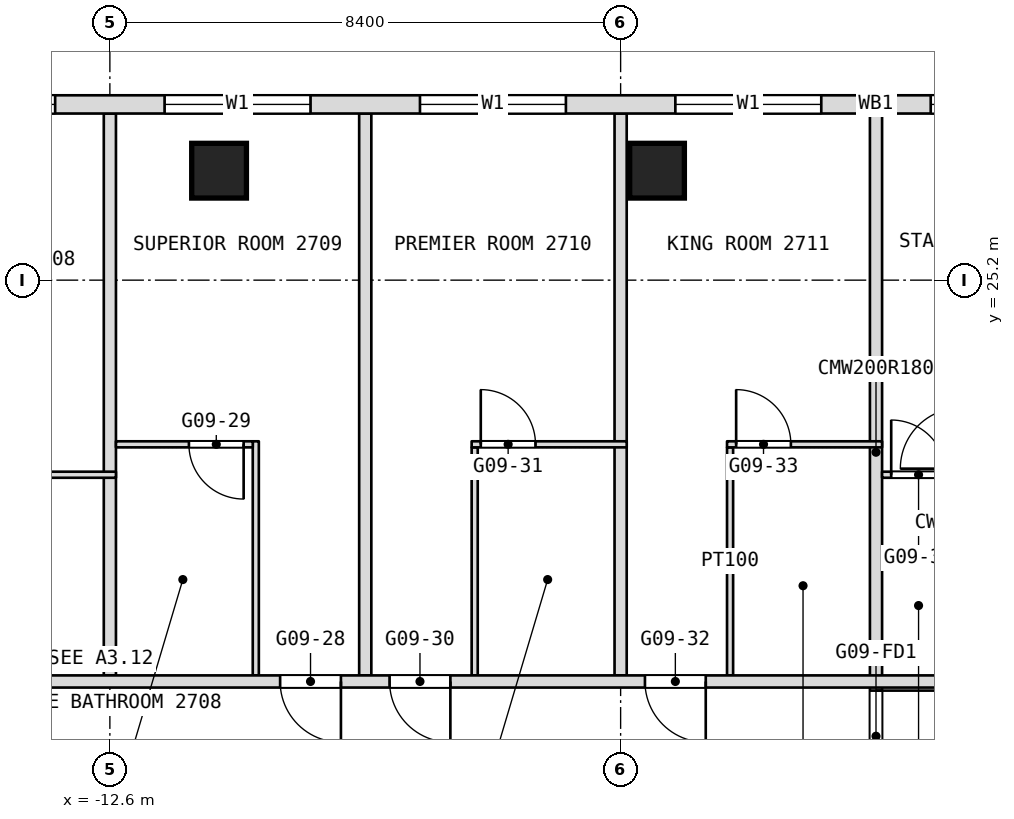
"""IFC4 building model, lengths in metres.
Left out: names, types, materials, properties, quantities, classifications, styles, units other than length and angle.
Written with IfcOpenShell. Run it as: python <this file> out.ifc"""

import sys

from ifc_helpers import new_model, si_unit, direction, frame, frame_2d, origin, origin_2d, place, context, subcontext, project, spatial, rectangle, extrude, element, fill, save


model = new_model("IFC4")
c1 = context("Model", 3, precision=1e-05, world=origin(), true_north=direction((0.0, 1.0)))
c2 = subcontext(c1, "Body", "Model", "MODEL_VIEW")
j1 = project(units=[si_unit("LENGTHUNIT", "METRE"), si_unit("PLANEANGLEUNIT", "RADIAN")], contexts=[c1])
p1 = place(None, origin())
s1 = spatial("IfcSite", under=j1, at=p1, CompositionType="ELEMENT")
p2 = place(p1, origin())
s2 = spatial("IfcBuilding", under=s1, at=p2, CompositionType="ELEMENT")
p3 = place(p2, frame((0.0, 0.0, 122.9)))
s3 = spatial("IfcBuildingStorey", under=s2, at=p3, CompositionType="ELEMENT", Elevation=122.9)
for number, where, z_axis, x_axis in (
    (1, (-10.804, 27.0, 0.0), (0.0, 0.0, 1.0), (1.0, 0.0, 0.0)),
    (2, (-3.601, 27.0, 0.0), (0.0, 0.0, 1.0), (1.0, 0.0, 0.0)),
):
    element("IfcColumn", number, at=place(p3, frame(where, z_axis=z_axis, x_axis=x_axis)), inside=s3, PredefinedType="COLUMN", context=c2, shape_type="SweptSolid", body=[
        extrude(rectangle(XDim=0.9, YDim=0.9, at=origin_2d()), origin(), (0.0, 0.0, 1.0), 3.6),
    ])
p4 = place(p3, frame((0.0, 16.8, 0.0), z_axis=(0.0, 0.0, 1.0), x_axis=(0.0, 1.0, 0.0)))
e3 = element("IfcWall", 3, at=p4, inside=s3, PredefinedType="PARTITIONING", context=c2, shape_type="SweptSolid", body=[
    extrude(rectangle(XDim=11.14, YDim=0.2, at=frame_2d((5.57, 0.0))), origin(), (0.0, 0.0, 1.0), 3.34),
])
p5 = place(p4, frame((0.15, 0.0, 0.0)))
e4 = element("IfcOpeningElement", 4, at=p5, cuts=e3, PredefinedType="OPENING", context=c2, shape_type="SweptSolid", body=[
    extrude(rectangle(XDim=1.5, YDim=2.1, at=frame_2d((0.75, 1.05))), frame((0.0, 0.1, 0.0), z_axis=(0.0, -1.0, 0.0), x_axis=(1.0, 0.0, 0.0)), (0.0, 0.0, 1.0), 0.2),
])
p6 = place(p3, frame((-2.4, 18.7, 0.0), z_axis=(0.0, 0.0, 1.0), x_axis=(0.0, 1.0, 0.0)))
e5 = element("IfcWall", 5, at=p6, inside=s3, PredefinedType="PARTITIONING", context=c2, shape_type="SweptSolid", body=[
    extrude(rectangle(XDim=3.75, YDim=0.1, at=frame_2d((1.875, 0.0))), origin(), (0.0, 0.0, 1.0), 3.34),
])
p7 = place(p3, frame((-4.2, 18.7, 0.0), z_axis=(0.0, 0.0, 1.0), x_axis=(0.0, 1.0, 0.0)))
e6 = element("IfcWall", 6, at=p7, inside=s3, PredefinedType="PARTITIONING", context=c2, shape_type="SweptSolid", body=[
    extrude(rectangle(XDim=9.24, YDim=0.2, at=frame_2d((4.62, 0.0))), origin(), (0.0, 0.0, 1.0), 3.34),
])
p8 = place(p3, frame((-6.6, 18.7, 0.0), z_axis=(0.0, 0.0, 1.0), x_axis=(0.0, 1.0, 0.0)))
e7 = element("IfcWall", 7, at=p8, inside=s3, PredefinedType="PARTITIONING", context=c2, shape_type="SweptSolid", body=[
    extrude(rectangle(XDim=3.75, YDim=0.1, at=frame_2d((1.875, 0.0))), origin(), (0.0, 0.0, 1.0), 3.34),
])
p9 = place(p3, frame((-8.4, 18.7, 0.0), z_axis=(0.0, 0.0, 1.0), x_axis=(0.0, 1.0, 0.0)))
e8 = element("IfcWall", 8, at=p9, inside=s3, PredefinedType="PARTITIONING", context=c2, shape_type="SweptSolid", body=[
    extrude(rectangle(XDim=9.24, YDim=0.2, at=frame_2d((4.62, 0.0))), origin(), (0.0, 0.0, 1.0), 3.34),
])
p10 = place(p3, frame((-10.2, 18.7, 0.0), z_axis=(0.0, 0.0, 1.0), x_axis=(0.0, 1.0, 0.0)))
e9 = element("IfcWall", 9, at=p10, inside=s3, PredefinedType="PARTITIONING", context=c2, shape_type="SweptSolid", body=[
    extrude(rectangle(XDim=3.85, YDim=0.1, at=frame_2d((1.925, 0.0))), origin(), (0.0, 0.0, 1.0), 3.34),
])
p11 = place(p3, frame((-12.6, 18.7, 0.0), z_axis=(0.0, 0.0, 1.0), x_axis=(0.0, 1.0, 0.0)))
e10 = element("IfcWall", 10, at=p11, inside=s3, PredefinedType="PARTITIONING", context=c2, shape_type="SweptSolid", body=[
    extrude(rectangle(XDim=9.24, YDim=0.2, at=frame_2d((4.62, 0.0))), origin(), (0.0, 0.0, 1.0), 3.34),
])
p12 = place(p3, frame((-16.9, 18.6, 0.0), z_axis=(0.0, 0.0, 1.0), x_axis=(1.0, 0.0, 0.0)))
e11 = element("IfcWall", 11, at=p12, inside=s3, PredefinedType="PARTITIONING", context=c2, shape_type="SweptSolid", body=[
    extrude(rectangle(XDim=18.4, YDim=0.2, at=frame_2d((9.2, 0.0))), origin(), (0.0, 0.0, 1.0), 3.34),
])
p13 = place(p12, frame((0.5, 0.0, 0.0)))
e12 = element("IfcOpeningElement", 12, at=p13, cuts=e11, PredefinedType="OPENING", context=c2, shape_type="SweptSolid", body=[
    extrude(rectangle(XDim=1.0, YDim=2.1, at=frame_2d((0.5, 1.05))), frame((0.0, 0.1, 0.0), z_axis=(0.0, -1.0, 0.0), x_axis=(1.0, 0.0, 0.0)), (0.0, 0.0, 1.0), 0.2),
])
p14 = place(p12, frame((7.1, 0.0, 0.0)))
e13 = element("IfcOpeningElement", 13, at=p14, cuts=e11, PredefinedType="OPENING", context=c2, shape_type="SweptSolid", body=[
    extrude(rectangle(XDim=1.0, YDim=2.1, at=frame_2d((0.5, 1.05))), frame((0.0, 0.1, 0.0), z_axis=(0.0, -1.0, 0.0), x_axis=(1.0, 0.0, 0.0)), (0.0, 0.0, 1.0), 0.2),
])
p15 = place(p12, frame((8.9, 0.0, 0.0)))
e14 = element("IfcOpeningElement", 14, at=p15, cuts=e11, PredefinedType="OPENING", context=c2, shape_type="SweptSolid", body=[
    extrude(rectangle(XDim=1.0, YDim=2.1, at=frame_2d((0.5, 1.05))), frame((0.0, 0.1, 0.0), z_axis=(0.0, -1.0, 0.0), x_axis=(1.0, 0.0, 0.0)), (0.0, 0.0, 1.0), 0.2),
])
p16 = place(p12, frame((13.1, 0.0, 0.0)))
e15 = element("IfcOpeningElement", 15, at=p16, cuts=e11, PredefinedType="OPENING", context=c2, shape_type="SweptSolid", body=[
    extrude(rectangle(XDim=1.0, YDim=2.1, at=frame_2d((0.5, 1.05))), frame((0.0, 0.1, 0.0), z_axis=(0.0, -1.0, 0.0), x_axis=(1.0, 0.0, 0.0)), (0.0, 0.0, 1.0), 0.2),
])
p17 = place(p3, frame((-15.05, 22.0, 0.0), z_axis=(0.0, 0.0, 1.0), x_axis=(1.0, 0.0, 0.0)))
e16 = element("IfcWall", 16, at=p17, inside=s3, PredefinedType="PARTITIONING", context=c2, shape_type="SweptSolid", body=[
    extrude(rectangle(XDim=2.55, YDim=0.1, at=frame_2d((1.275, 0.0))), origin(), (0.0, 0.0, 1.0), 3.34),
])
p18 = place(p17, frame((0.15, 0.0, 0.0)))
e17 = element("IfcOpeningElement", 17, at=p18, cuts=e16, PredefinedType="OPENING", context=c2, shape_type="SweptSolid", body=[
    extrude(rectangle(XDim=0.9, YDim=2.1, at=frame_2d((0.45, 1.05))), frame((0.0, 0.05, 0.0), z_axis=(0.0, -1.0, 0.0), x_axis=(1.0, 0.0, 0.0)), (0.0, 0.0, 1.0), 0.1),
])
p19 = place(p3, frame((0.1, 22.0, 0.0), z_axis=(0.0, 0.0, 1.0), x_axis=(1.0, 0.0, 0.0)))
e18 = element("IfcWall", 18, at=p19, inside=s3, PredefinedType="PARTITIONING", context=c2, shape_type="SweptSolid", body=[
    extrude(rectangle(XDim=1.2, YDim=0.1, at=frame_2d((0.6, 0.0))), origin(), (0.0, 0.0, 1.0), 3.34),
])
p20 = place(p19, frame((0.15, 0.0, 0.0)))
e19 = element("IfcOpeningElement", 19, at=p20, cuts=e18, PredefinedType="OPENING", context=c2, shape_type="SweptSolid", body=[
    extrude(rectangle(XDim=0.9, YDim=2.1, at=frame_2d((0.45, 1.05))), frame((0.0, 0.05, 0.0), z_axis=(0.0, -1.0, 0.0), x_axis=(1.0, 0.0, 0.0)), (0.0, 0.0, 1.0), 0.1),
])
p21 = place(p3, frame((-12.5, 22.5, 0.0), z_axis=(0.0, 0.0, 1.0), x_axis=(1.0, 0.0, 0.0)))
e20 = element("IfcWall", 20, at=p21, inside=s3, PredefinedType="PARTITIONING", context=c2, shape_type="SweptSolid", body=[
    extrude(rectangle(XDim=2.25, YDim=0.1, at=frame_2d((1.125, 0.0))), origin(), (0.0, 0.0, 1.0), 3.34),
])
p22 = place(p21, frame((1.2, 0.0, 0.0)))
e21 = element("IfcOpeningElement", 21, at=p22, cuts=e20, PredefinedType="OPENING", context=c2, shape_type="SweptSolid", body=[
    extrude(rectangle(XDim=0.9, YDim=2.1, at=frame_2d((0.45, 1.05))), frame((0.0, 0.05, 0.0), z_axis=(0.0, -1.0, 0.0), x_axis=(1.0, 0.0, 0.0)), (0.0, 0.0, 1.0), 0.1),
])
p23 = place(p3, frame((-6.65, 22.5, 0.0), z_axis=(0.0, 0.0, 1.0), x_axis=(1.0, 0.0, 0.0)))
e22 = element("IfcWall", 22, at=p23, inside=s3, PredefinedType="PARTITIONING", context=c2, shape_type="SweptSolid", body=[
    extrude(rectangle(XDim=2.55, YDim=0.1, at=frame_2d((1.275, 0.0))), origin(), (0.0, 0.0, 1.0), 3.34),
])
p24 = place(p23, frame((0.15, 0.0, 0.0)))
e23 = element("IfcOpeningElement", 23, at=p24, cuts=e22, PredefinedType="OPENING", context=c2, shape_type="SweptSolid", body=[
    extrude(rectangle(XDim=0.9, YDim=2.1, at=frame_2d((0.45, 1.05))), frame((0.0, 0.05, 0.0), z_axis=(0.0, -1.0, 0.0), x_axis=(1.0, 0.0, 0.0)), (0.0, 0.0, 1.0), 0.1),
])
p25 = place(p3, frame((-2.45, 22.5, 0.0), z_axis=(0.0, 0.0, 1.0), x_axis=(1.0, 0.0, 0.0)))
e24 = element("IfcWall", 24, at=p25, inside=s3, PredefinedType="PARTITIONING", context=c2, shape_type="SweptSolid", body=[
    extrude(rectangle(XDim=2.55, YDim=0.1, at=frame_2d((1.275, 0.0))), origin(), (0.0, 0.0, 1.0), 3.34),
])
p26 = place(p25, frame((0.15, 0.0, 0.0)))
e25 = element("IfcOpeningElement", 25, at=p26, cuts=e24, PredefinedType="OPENING", context=c2, shape_type="SweptSolid", body=[
    extrude(rectangle(XDim=0.9, YDim=2.1, at=frame_2d((0.45, 1.05))), frame((0.0, 0.05, 0.0), z_axis=(0.0, -1.0, 0.0), x_axis=(1.0, 0.0, 0.0)), (0.0, 0.0, 1.0), 0.1),
])
p27 = place(p3, frame((21.306, 28.09, 0.0), z_axis=(0.0, 0.0, 1.0), x_axis=(-1.0, 0.0, 0.0)))
e26 = element("IfcWall", 26, at=p27, inside=s3, PredefinedType="NOTDEFINED", context=c2, shape_type="SweptSolid", body=[
    extrude(rectangle(XDim=42.612, YDim=0.3, at=frame_2d((21.306, 0.0))), origin(), (0.0, 0.0, 1.0), 3.6),
])
p28 = place(p27, frame((5.406, 0.0, 0.9)))
e27 = element("IfcOpeningElement", 27, at=p28, cuts=e26, PredefinedType="OPENING", context=c2, shape_type="SweptSolid", body=[
    extrude(rectangle(XDim=2.4, YDim=2.1, at=frame_2d((1.2, 1.05))), frame((0.0, 0.15, 0.0), z_axis=(0.0, -1.0, 0.0), x_axis=(1.0, 0.0, 0.0)), (0.0, 0.0, 1.0), 0.3),
])
p29 = place(p27, frame((9.606, 0.0, 0.9)))
e28 = element("IfcOpeningElement", 28, at=p29, cuts=e26, PredefinedType="OPENING", context=c2, shape_type="SweptSolid", body=[
    extrude(rectangle(XDim=2.4, YDim=2.1, at=frame_2d((1.2, 1.05))), frame((0.0, 0.15, 0.0), z_axis=(0.0, -1.0, 0.0), x_axis=(1.0, 0.0, 0.0)), (0.0, 0.0, 1.0), 0.3),
])
p30 = place(p27, frame((13.806, 0.0, 0.9)))
e29 = element("IfcOpeningElement", 29, at=p30, cuts=e26, PredefinedType="OPENING", context=c2, shape_type="SweptSolid", body=[
    extrude(rectangle(XDim=2.4, YDim=2.1, at=frame_2d((1.2, 1.05))), frame((0.0, 0.15, 0.0), z_axis=(0.0, -1.0, 0.0), x_axis=(1.0, 0.0, 0.0)), (0.0, 0.0, 1.0), 0.3),
])
p31 = place(p27, frame((18.006, 0.0, 0.9)))
e30 = element("IfcOpeningElement", 30, at=p31, cuts=e26, PredefinedType="OPENING", context=c2, shape_type="SweptSolid", body=[
    extrude(rectangle(XDim=2.4, YDim=2.1, at=frame_2d((1.2, 1.05))), frame((0.0, 0.15, 0.0), z_axis=(0.0, -1.0, 0.0), x_axis=(1.0, 0.0, 0.0)), (0.0, 0.0, 1.0), 0.3),
])
p32 = place(p27, frame((22.206, 0.0, 0.9)))
e31 = element("IfcOpeningElement", 31, at=p32, cuts=e26, PredefinedType="OPENING", context=c2, shape_type="SweptSolid", body=[
    extrude(rectangle(XDim=2.4, YDim=2.1, at=frame_2d((1.2, 1.05))), frame((0.0, 0.15, 0.0), z_axis=(0.0, -1.0, 0.0), x_axis=(1.0, 0.0, 0.0)), (0.0, 0.0, 1.0), 0.3),
])
p33 = place(p27, frame((26.406, 0.0, 0.9)))
e32 = element("IfcOpeningElement", 32, at=p33, cuts=e26, PredefinedType="OPENING", context=c2, shape_type="SweptSolid", body=[
    extrude(rectangle(XDim=2.4, YDim=2.1, at=frame_2d((1.2, 1.05))), frame((0.0, 0.15, 0.0), z_axis=(0.0, -1.0, 0.0), x_axis=(1.0, 0.0, 0.0)), (0.0, 0.0, 1.0), 0.3),
])
p34 = place(p27, frame((30.606, 0.0, 0.9)))
e33 = element("IfcOpeningElement", 33, at=p34, cuts=e26, PredefinedType="OPENING", context=c2, shape_type="SweptSolid", body=[
    extrude(rectangle(XDim=2.4, YDim=2.1, at=frame_2d((1.2, 1.05))), frame((0.0, 0.15, 0.0), z_axis=(0.0, -1.0, 0.0), x_axis=(1.0, 0.0, 0.0)), (0.0, 0.0, 1.0), 0.3),
])
p35 = place(p27, frame((34.806, 0.0, 0.9)))
e34 = element("IfcOpeningElement", 34, at=p35, cuts=e26, PredefinedType="OPENING", context=c2, shape_type="SweptSolid", body=[
    extrude(rectangle(XDim=2.4, YDim=2.1, at=frame_2d((1.2, 1.05))), frame((0.0, 0.15, 0.0), z_axis=(0.0, -1.0, 0.0), x_axis=(1.0, 0.0, 0.0)), (0.0, 0.0, 1.0), 0.3),
])
p36 = place(p14, origin())
e35 = element("IfcDoor", 35, at=p36, inside=s3, OperationType="SINGLE_SWING_LEFT", PredefinedType="DOOR", context=c2, shape_type="SweptSolid", body=[
    extrude(rectangle(XDim=1.0, YDim=2.1, at=frame_2d((0.5, 1.05))), frame((0.0, 0.025, 0.0), z_axis=(0.0, -1.0, 0.0), x_axis=(1.0, 0.0, 0.0)), (0.0, 0.0, 1.0), 0.05),
])
fill(e13, e35)
p37 = place(p15, origin())
e36 = element("IfcDoor", 36, at=p37, inside=s3, OperationType="SINGLE_SWING_LEFT", PredefinedType="DOOR", context=c2, shape_type="SweptSolid", body=[
    extrude(rectangle(XDim=1.0, YDim=2.1, at=frame_2d((0.5, 1.05))), frame((0.0, 0.025, 0.0), z_axis=(0.0, -1.0, 0.0), x_axis=(1.0, 0.0, 0.0)), (0.0, 0.0, 1.0), 0.05),
])
fill(e14, e36)
p38 = place(p16, origin())
e37 = element("IfcDoor", 37, at=p38, inside=s3, OperationType="SINGLE_SWING_LEFT", PredefinedType="DOOR", context=c2, shape_type="SweptSolid", body=[
    extrude(rectangle(XDim=1.0, YDim=2.1, at=frame_2d((0.5, 1.05))), frame((0.0, 0.025, 0.0), z_axis=(0.0, -1.0, 0.0), x_axis=(1.0, 0.0, 0.0)), (0.0, 0.0, 1.0), 0.05),
])
fill(e15, e37)
p39 = place(p20, origin())
e38 = element("IfcDoor", 38, at=p39, inside=s3, OperationType="SINGLE_SWING_LEFT", PredefinedType="DOOR", context=c2, shape_type="SweptSolid", body=[
    extrude(rectangle(XDim=0.9, YDim=2.1, at=frame_2d((0.45, 1.05))), frame((0.0, 0.025, 0.0), z_axis=(0.0, -1.0, 0.0), x_axis=(1.0, 0.0, 0.0)), (0.0, 0.0, 1.0), 0.05),
])
fill(e19, e38)
p40 = place(p22, origin())
e39 = element("IfcDoor", 39, at=p40, inside=s3, OperationType="SINGLE_SWING_LEFT", PredefinedType="DOOR", context=c2, shape_type="SweptSolid", body=[
    extrude(rectangle(XDim=0.9, YDim=2.1, at=frame_2d((0.45, 1.05))), frame((0.0, 0.025, 0.0), z_axis=(0.0, -1.0, 0.0), x_axis=(1.0, 0.0, 0.0)), (0.0, 0.0, 1.0), 0.05),
])
fill(e21, e39)
p41 = place(p24, origin())
e40 = element("IfcDoor", 40, at=p41, inside=s3, OperationType="SINGLE_SWING_RIGHT", PredefinedType="DOOR", context=c2, shape_type="SweptSolid", body=[
    extrude(rectangle(XDim=0.9, YDim=2.1, at=frame_2d((0.45, 1.05))), frame((0.0, 0.025, 0.0), z_axis=(0.0, -1.0, 0.0), x_axis=(1.0, 0.0, 0.0)), (0.0, 0.0, 1.0), 0.05),
])
fill(e23, e40)
p42 = place(p26, origin())
e41 = element("IfcDoor", 41, at=p42, inside=s3, OperationType="SINGLE_SWING_RIGHT", PredefinedType="DOOR", context=c2, shape_type="SweptSolid", body=[
    extrude(rectangle(XDim=0.9, YDim=2.1, at=frame_2d((0.45, 1.05))), frame((0.0, 0.025, 0.0), z_axis=(0.0, -1.0, 0.0), x_axis=(1.0, 0.0, 0.0)), (0.0, 0.0, 1.0), 0.05),
])
fill(e25, e41)
p43 = place(p31, origin())
e42 = element("IfcWindow", 42, at=p43, inside=s3, PartitioningType="SINGLE_PANEL", PredefinedType="WINDOW", context=c2, shape_type="SweptSolid", body=[
    extrude(rectangle(XDim=2.4, YDim=2.1, at=frame_2d((1.2, 1.05))), frame((0.0, 0.03, 0.0), z_axis=(0.0, -1.0, 0.0), x_axis=(1.0, 0.0, 0.0)), (0.0, 0.0, 1.0), 0.06),
])
fill(e30, e42)
p44 = place(p32, origin())
e43 = element("IfcWindow", 43, at=p44, inside=s3, PartitioningType="SINGLE_PANEL", PredefinedType="WINDOW", context=c2, shape_type="SweptSolid", body=[
    extrude(rectangle(XDim=2.4, YDim=2.1, at=frame_2d((1.2, 1.05))), frame((0.0, 0.03, 0.0), z_axis=(0.0, -1.0, 0.0), x_axis=(1.0, 0.0, 0.0)), (0.0, 0.0, 1.0), 0.06),
])
fill(e31, e43)
p45 = place(p33, origin())
e44 = element("IfcWindow", 44, at=p45, inside=s3, PartitioningType="SINGLE_PANEL", PredefinedType="WINDOW", context=c2, shape_type="SweptSolid", body=[
    extrude(rectangle(XDim=2.4, YDim=2.1, at=frame_2d((1.2, 1.05))), frame((0.0, 0.03, 0.0), z_axis=(0.0, -1.0, 0.0), x_axis=(1.0, 0.0, 0.0)), (0.0, 0.0, 1.0), 0.06),
])
fill(e32, e44)
p46 = place(p34, origin())
e45 = element("IfcWindow", 45, at=p46, inside=s3, PartitioningType="SINGLE_PANEL", PredefinedType="WINDOW", context=c2, shape_type="SweptSolid", body=[
    extrude(rectangle(XDim=2.4, YDim=2.1, at=frame_2d((1.2, 1.05))), frame((0.0, 0.03, 0.0), z_axis=(0.0, -1.0, 0.0), x_axis=(1.0, 0.0, 0.0)), (0.0, 0.0, 1.0), 0.06),
])
fill(e33, e45)
p47 = place(p35, origin())
e46 = element("IfcWindow", 46, at=p47, inside=s3, PartitioningType="SINGLE_PANEL", PredefinedType="WINDOW", context=c2, shape_type="SweptSolid", body=[
    extrude(rectangle(XDim=2.4, YDim=2.1, at=frame_2d((1.2, 1.05))), frame((0.0, 0.03, 0.0), z_axis=(0.0, -1.0, 0.0), x_axis=(1.0, 0.0, 0.0)), (0.0, 0.0, 1.0), 0.06),
])
fill(e34, e46)
p48 = place(p5, origin())
e47 = element("IfcDoor", 47, at=p48, inside=s3, OperationType="DOUBLE_DOOR_DOUBLE_SWING", PredefinedType="DOOR", context=c2, shape_type="SweptSolid", body=[
    extrude(rectangle(XDim=1.5, YDim=2.1, at=frame_2d((0.75, 1.05))), frame((0.0, 0.025, 0.0), z_axis=(0.0, -1.0, 0.0), x_axis=(1.0, 0.0, 0.0)), (0.0, 0.0, 1.0), 0.05),
])
fill(e4, e47)
save(model, sys.argv[1])
